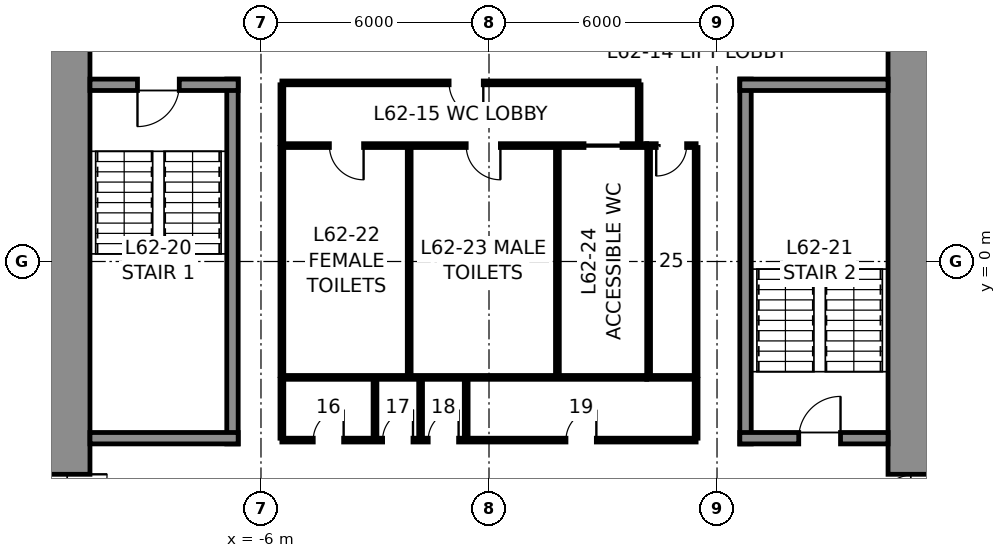
"""IFC4 building model, lengths in metres.
Left out: names, types, materials, properties, quantities, classifications, styles, units other than length and angle.
Written with IfcOpenShell. Run it as: python <this file> out.ifc"""

import sys

from ifc_helpers import new_model, si_unit, direction, frame, frame_2d, origin, place, context, subcontext, project, spatial, rectangle, extrude, element, fill, save


model = new_model("IFC4")
c1 = context("Model", 3, precision=1e-05, world=origin(), true_north=direction((0.0, 1.0)))
c2 = subcontext(c1, "Body", "Model", "MODEL_VIEW")
j1 = project(units=[si_unit("LENGTHUNIT", "METRE"), si_unit("PLANEANGLEUNIT", "RADIAN")], contexts=[c1])
p1 = place(None, origin())
s1 = spatial("IfcSite", under=j1, at=p1, CompositionType="ELEMENT")
p2 = place(p1, origin())
s2 = spatial("IfcBuilding", under=s1, at=p2, CompositionType="ELEMENT")
p3 = place(p2, frame((0.0, 0.0, 277.8)))
s3 = spatial("IfcBuildingStorey", under=s2, at=p3, CompositionType="ELEMENT", Elevation=277.8)
p4 = place(p3, frame((11.25, 10.5, 0.0), z_axis=(0.0, 0.0, 1.0), x_axis=(0.0, -1.0, 0.0)))
e1 = element("IfcWall", 1, at=p4, inside=s3, PredefinedType="SHEAR", context=c2, shape_type="SweptSolid", body=[
    extrude(rectangle(XDim=21.0, YDim=1.5, at=frame_2d((10.5, 0.0))), origin(), (0.0, 0.0, 1.0), 4.0),
])
p5 = place(p4, frame((3.7, 0.0, 0.0)))
e2 = element("IfcOpeningElement", 2, at=p5, cuts=e1, PredefinedType="OPENING", context=c2, shape_type="SweptSolid", body=[
    extrude(rectangle(XDim=1.2, YDim=2.3, at=frame_2d((0.6, 1.15))), frame((0.0, 0.76, 0.0), z_axis=(0.0, -1.0, 0.0), x_axis=(1.0, 0.0, 0.0)), (0.0, 0.0, 1.0), 1.52),
])
p6 = place(p4, frame((16.1, 0.0, 0.0)))
e3 = element("IfcOpeningElement", 3, at=p6, cuts=e1, PredefinedType="OPENING", context=c2, shape_type="SweptSolid", body=[
    extrude(rectangle(XDim=1.2, YDim=2.3, at=frame_2d((0.6, 1.15))), frame((0.0, 0.76, 0.0), z_axis=(0.0, -1.0, 0.0), x_axis=(1.0, 0.0, 0.0)), (0.0, 0.0, 1.0), 1.52),
])
p7 = place(p3, frame((-11.25, -10.5, 0.0), z_axis=(0.0, 0.0, 1.0), x_axis=(0.0, 1.0, 0.0)))
e4 = element("IfcWall", 4, at=p7, inside=s3, PredefinedType="SHEAR", context=c2, shape_type="SweptSolid", body=[
    extrude(rectangle(XDim=21.0, YDim=1.5, at=frame_2d((10.5, 0.0))), origin(), (0.0, 0.0, 1.0), 4.0),
])
p8 = place(p7, frame((16.1, 0.0, 0.0)))
e5 = element("IfcOpeningElement", 5, at=p8, cuts=e4, PredefinedType="OPENING", context=c2, shape_type="SweptSolid", body=[
    extrude(rectangle(XDim=1.2, YDim=2.3, at=frame_2d((0.6, 1.15))), frame((0.0, 0.76, 0.0), z_axis=(0.0, -1.0, 0.0), x_axis=(1.0, 0.0, 0.0)), (0.0, 0.0, 1.0), 1.52),
])
p9 = place(p7, frame((3.7, 0.0, 0.0)))
e6 = element("IfcOpeningElement", 6, at=p9, cuts=e4, PredefinedType="OPENING", context=c2, shape_type="SweptSolid", body=[
    extrude(rectangle(XDim=1.2, YDim=2.3, at=frame_2d((0.6, 1.15))), frame((0.0, 0.76, 0.0), z_axis=(0.0, -1.0, 0.0), x_axis=(1.0, 0.0, 0.0)), (0.0, 0.0, 1.0), 1.52),
])
p10 = place(p3, frame((-6.75, -4.8, 0.0), z_axis=(0.0, 0.0, 1.0), x_axis=(0.0, 1.0, 0.0)))
e7 = element("IfcWall", 7, at=p10, inside=s3, PredefinedType="SOLIDWALL", context=c2, shape_type="SweptSolid", body=[
    extrude(rectangle(XDim=9.6, YDim=0.3, at=frame_2d((4.8, 0.0))), origin(), (0.0, 0.0, 1.0), 3.75),
])
p11 = place(p3, frame((-10.5, 4.65, 0.0), z_axis=(0.0, 0.0, 1.0), x_axis=(1.0, 0.0, 0.0)))
e8 = element("IfcWall", 8, at=p11, inside=s3, PredefinedType="SOLIDWALL", context=c2, shape_type="SweptSolid", body=[
    extrude(rectangle(XDim=3.9, YDim=0.3, at=frame_2d((1.95, 0.0))), origin(), (0.0, 0.0, 1.0), 3.75),
])
p12 = place(p11, frame((1.25, 0.0, 0.0)))
e9 = element("IfcOpeningElement", 9, at=p12, cuts=e8, PredefinedType="OPENING", context=c2, shape_type="SweptSolid", body=[
    extrude(rectangle(XDim=1.1, YDim=2.3, at=frame_2d((0.55, 1.15))), frame((0.0, 0.16, 0.0), z_axis=(0.0, -1.0, 0.0), x_axis=(1.0, 0.0, 0.0)), (0.0, 0.0, 1.0), 0.32),
])
p13 = place(p3, frame((-6.6, -4.65, 0.0), z_axis=(0.0, 0.0, 1.0), x_axis=(-1.0, 0.0, 0.0)))
e10 = element("IfcWall", 10, at=p13, inside=s3, PredefinedType="SOLIDWALL", context=c2, shape_type="SweptSolid", body=[
    extrude(rectangle(XDim=3.9, YDim=0.3, at=frame_2d((1.95, 0.0))), origin(), (0.0, 0.0, 1.0), 3.75),
])
p14 = place(p3, frame((6.75, -4.8, 0.0), z_axis=(0.0, 0.0, 1.0), x_axis=(0.0, 1.0, 0.0)))
e11 = element("IfcWall", 11, at=p14, inside=s3, PredefinedType="SOLIDWALL", context=c2, shape_type="SweptSolid", body=[
    extrude(rectangle(XDim=9.6, YDim=0.3, at=frame_2d((4.8, 0.0))), origin(), (0.0, 0.0, 1.0), 3.75),
])
p15 = place(p3, frame((6.6, 4.65, 0.0), z_axis=(0.0, 0.0, 1.0), x_axis=(1.0, 0.0, 0.0)))
e12 = element("IfcWall", 12, at=p15, inside=s3, PredefinedType="SOLIDWALL", context=c2, shape_type="SweptSolid", body=[
    extrude(rectangle(XDim=3.9, YDim=0.3, at=frame_2d((1.95, 0.0))), origin(), (0.0, 0.0, 1.0), 3.75),
])
p16 = place(p3, frame((10.5, -4.65, 0.0), z_axis=(0.0, 0.0, 1.0), x_axis=(-1.0, 0.0, 0.0)))
e13 = element("IfcWall", 13, at=p16, inside=s3, PredefinedType="SOLIDWALL", context=c2, shape_type="SweptSolid", body=[
    extrude(rectangle(XDim=3.9, YDim=0.3, at=frame_2d((1.95, 0.0))), origin(), (0.0, 0.0, 1.0), 3.75),
])
p17 = place(p16, frame((1.25, 0.0, 0.0)))
e14 = element("IfcOpeningElement", 14, at=p17, cuts=e13, PredefinedType="OPENING", context=c2, shape_type="SweptSolid", body=[
    extrude(rectangle(XDim=1.1, YDim=2.3, at=frame_2d((0.55, 1.15))), frame((0.0, 0.16, 0.0), z_axis=(0.0, -1.0, 0.0), x_axis=(1.0, 0.0, 0.0)), (0.0, 0.0, 1.0), 0.32),
])
p18 = place(p3, frame((-5.45, 3.05, 0.0), z_axis=(0.0, 0.0, 1.0), x_axis=(1.0, 0.0, 0.0)))
e15 = element("IfcWall", 15, at=p18, inside=s3, PredefinedType="PARTITIONING", context=c2, shape_type="SweptSolid", body=[
    extrude(rectangle(XDim=9.6, YDim=0.1, at=frame_2d((4.8, 0.0))), origin(), (0.0, 0.0, 1.0), 3.75),
])
p19 = place(p18, frame((1.25, 0.0, 0.0)))
e16 = element("IfcOpeningElement", 16, at=p19, cuts=e15, PredefinedType="OPENING", context=c2, shape_type="SweptSolid", body=[
    extrude(rectangle(XDim=0.9, YDim=2.3, at=frame_2d((0.45, 1.15))), frame((0.0, 0.06, 0.0), z_axis=(0.0, -1.0, 0.0), x_axis=(1.0, 0.0, 0.0)), (0.0, 0.0, 1.0), 0.12),
])
p20 = place(p18, frame((4.85, 0.0, 0.0)))
e17 = element("IfcOpeningElement", 17, at=p20, cuts=e15, PredefinedType="OPENING", context=c2, shape_type="SweptSolid", body=[
    extrude(rectangle(XDim=0.9, YDim=2.3, at=frame_2d((0.45, 1.15))), frame((0.0, 0.06, 0.0), z_axis=(0.0, -1.0, 0.0), x_axis=(1.0, 0.0, 0.0)), (0.0, 0.0, 1.0), 0.12),
])
p21 = place(p18, frame((7.95, 0.0, 0.0)))
e18 = element("IfcOpeningElement", 18, at=p21, cuts=e15, PredefinedType="OPENING", context=c2, shape_type="SweptSolid", body=[
    extrude(rectangle(XDim=1.0, YDim=2.3, at=frame_2d((0.5, 1.15))), frame((0.0, 0.06, 0.0), z_axis=(0.0, -1.0, 0.0), x_axis=(1.0, 0.0, 0.0)), (0.0, 0.0, 1.0), 0.12),
])
p22 = place(p3, frame((4.15, 3.05, 0.0), z_axis=(0.0, 0.0, 1.0), x_axis=(1.0, 0.0, 0.0)))
e19 = element("IfcWall", 19, at=p22, inside=s3, PredefinedType="PARTITIONING", context=c2, shape_type="SweptSolid", body=[
    extrude(rectangle(XDim=1.3, YDim=0.1, at=frame_2d((0.65, 0.0))), origin(), (0.0, 0.0, 1.0), 3.75),
])
p23 = place(p22, frame((0.25, 0.0, 0.0)))
e20 = element("IfcOpeningElement", 20, at=p23, cuts=e19, PredefinedType="OPENING", context=c2, shape_type="SweptSolid", body=[
    extrude(rectangle(XDim=0.8, YDim=2.3, at=frame_2d((0.4, 1.15))), frame((0.0, 0.06, 0.0), z_axis=(0.0, -1.0, 0.0), x_axis=(1.0, 0.0, 0.0)), (0.0, 0.0, 1.0), 0.12),
])
p24 = place(p3, frame((4.15, -3.05, 0.0), z_axis=(0.0, 0.0, 1.0), x_axis=(-1.0, 0.0, 0.0)))
e21 = element("IfcWall", 21, at=p24, inside=s3, PredefinedType="PARTITIONING", context=c2, shape_type="SweptSolid", body=[
    extrude(rectangle(XDim=9.6, YDim=0.1, at=frame_2d((4.8, 0.0))), origin(), (0.0, 0.0, 1.0), 3.75),
])
p25 = place(p3, frame((5.45, -3.05, 0.0), z_axis=(0.0, 0.0, 1.0), x_axis=(-1.0, 0.0, 0.0)))
e22 = element("IfcWall", 22, at=p25, inside=s3, PredefinedType="PARTITIONING", context=c2, shape_type="SweptSolid", body=[
    extrude(rectangle(XDim=1.3, YDim=0.1, at=frame_2d((0.65, 0.0))), origin(), (0.0, 0.0, 1.0), 3.75),
])
for number, where, z_axis, x_axis in (
    (23, (5.45, 3.0, 0.0), (0.0, 0.0, 1.0), (0.0, -1.0, 0.0)),
    (24, (-5.45, -3.0, 0.0), (0.0, 0.0, 1.0), (0.0, 1.0, 0.0)),
    (25, (-2.1, -3.0, 0.0), (0.0, 0.0, 1.0), (0.0, 1.0, 0.0)),
    (26, (1.8, -3.0, 0.0), (0.0, 0.0, 1.0), (0.0, 1.0, 0.0)),
    (27, (4.2, -3.0, 0.0), (0.0, 0.0, 1.0), (0.0, 1.0, 0.0)),
):
    element("IfcWall", number, at=place(p3, frame(where, z_axis=z_axis, x_axis=x_axis)), inside=s3, PredefinedType="PARTITIONING", context=c2, shape_type="SweptSolid", body=[
        extrude(rectangle(XDim=6.0, YDim=0.1, at=frame_2d((3.0, 0.0))), origin(), (0.0, 0.0, 1.0), 3.75),
    ])
p26 = place(p3, frame((-5.45, 4.7, 0.0), z_axis=(0.0, 0.0, 1.0), x_axis=(1.0, 0.0, 0.0)))
e28 = element("IfcWall", 28, at=p26, inside=s3, PredefinedType="PARTITIONING", context=c2, shape_type="SweptSolid", body=[
    extrude(rectangle(XDim=9.4, YDim=0.1, at=frame_2d((4.7, 0.0))), origin(), (0.0, 0.0, 1.0), 3.75),
])
p27 = place(p26, frame((4.4, 0.0, 0.0)))
e29 = element("IfcOpeningElement", 29, at=p27, cuts=e28, PredefinedType="OPENING", context=c2, shape_type="SweptSolid", body=[
    extrude(rectangle(XDim=0.9, YDim=2.3, at=frame_2d((0.45, 1.15))), frame((0.0, 0.06, 0.0), z_axis=(0.0, -1.0, 0.0), x_axis=(1.0, 0.0, 0.0)), (0.0, 0.0, 1.0), 0.12),
])
for number, where, z_axis, x_axis in (
    (30, (-5.45, 3.1, 0.0), (0.0, 0.0, 1.0), (0.0, 1.0, 0.0)),
    (31, (3.95, 3.1, 0.0), (0.0, 0.0, 1.0), (0.0, 1.0, 0.0)),
):
    element("IfcWall", number, at=place(p3, frame(where, z_axis=z_axis, x_axis=x_axis)), inside=s3, PredefinedType="PARTITIONING", context=c2, shape_type="SweptSolid", body=[
        extrude(rectangle(XDim=1.55, YDim=0.1, at=frame_2d((0.775, 0.0))), origin(), (0.0, 0.0, 1.0), 3.75),
    ])
p28 = place(p3, frame((5.45, -4.7, 0.0), z_axis=(0.0, 0.0, 1.0), x_axis=(-1.0, 0.0, 0.0)))
e32 = element("IfcWall", 32, at=p28, inside=s3, PredefinedType="PARTITIONING", context=c2, shape_type="SweptSolid", body=[
    extrude(rectangle(XDim=10.9, YDim=0.1, at=frame_2d((5.45, 0.0))), origin(), (0.0, 0.0, 1.0), 3.75),
])
p29 = place(p28, frame((9.275, 0.0, 0.0)))
e33 = element("IfcOpeningElement", 33, at=p29, cuts=e32, PredefinedType="OPENING", context=c2, shape_type="SweptSolid", body=[
    extrude(rectangle(XDim=0.8, YDim=2.3, at=frame_2d((0.4, 1.15))), frame((0.0, 0.06, 0.0), z_axis=(0.0, -1.0, 0.0), x_axis=(1.0, 0.0, 0.0)), (0.0, 0.0, 1.0), 0.12),
])
p30 = place(p28, frame((7.45, 0.0, 0.0)))
e34 = element("IfcOpeningElement", 34, at=p30, cuts=e32, PredefinedType="OPENING", context=c2, shape_type="SweptSolid", body=[
    extrude(rectangle(XDim=0.8, YDim=2.3, at=frame_2d((0.4, 1.15))), frame((0.0, 0.06, 0.0), z_axis=(0.0, -1.0, 0.0), x_axis=(1.0, 0.0, 0.0)), (0.0, 0.0, 1.0), 0.12),
])
p31 = place(p28, frame((6.25, 0.0, 0.0)))
e35 = element("IfcOpeningElement", 35, at=p31, cuts=e32, PredefinedType="OPENING", context=c2, shape_type="SweptSolid", body=[
    extrude(rectangle(XDim=0.8, YDim=2.3, at=frame_2d((0.4, 1.15))), frame((0.0, 0.06, 0.0), z_axis=(0.0, -1.0, 0.0), x_axis=(1.0, 0.0, 0.0)), (0.0, 0.0, 1.0), 0.12),
])
p32 = place(p28, frame((2.625, 0.0, 0.0)))
e36 = element("IfcOpeningElement", 36, at=p32, cuts=e32, PredefinedType="OPENING", context=c2, shape_type="SweptSolid", body=[
    extrude(rectangle(XDim=0.8, YDim=2.3, at=frame_2d((0.4, 1.15))), frame((0.0, 0.06, 0.0), z_axis=(0.0, -1.0, 0.0), x_axis=(1.0, 0.0, 0.0)), (0.0, 0.0, 1.0), 0.12),
])
for number, where, z_axis, x_axis in (
    (37, (-5.45, -3.1, 0.0), (0.0, 0.0, 1.0), (0.0, -1.0, 0.0)),
    (38, (5.45, -3.1, 0.0), (0.0, 0.0, 1.0), (0.0, -1.0, 0.0)),
    (39, (-3.0, -3.1, 0.0), (0.0, 0.0, 1.0), (0.0, -1.0, 0.0)),
    (40, (-1.8, -3.1, 0.0), (0.0, 0.0, 1.0), (0.0, -1.0, 0.0)),
    (41, (-0.6, -3.1, 0.0), (0.0, 0.0, 1.0), (0.0, -1.0, 0.0)),
):
    element("IfcWall", number, at=place(p3, frame(where, z_axis=z_axis, x_axis=x_axis)), inside=s3, PredefinedType="PARTITIONING", context=c2, shape_type="SweptSolid", body=[
        extrude(rectangle(XDim=1.55, YDim=0.1, at=frame_2d((0.775, 0.0))), origin(), (0.0, 0.0, 1.0), 3.75),
    ])
p33 = place(p12, frame((1.1, 0.0, 0.0), z_axis=(0.0, 0.0, 1.0), x_axis=(-1.0, 0.0, 0.0)))
e42 = element("IfcDoor", 42, at=p33, inside=s3, OperationType="SINGLE_SWING_RIGHT", PredefinedType="DOOR", context=c2, shape_type="SweptSolid", body=[
    extrude(rectangle(XDim=1.1, YDim=2.3, at=frame_2d((0.55, 1.15))), frame((0.0, 0.025, 0.0), z_axis=(0.0, -1.0, 0.0), x_axis=(1.0, 0.0, 0.0)), (0.0, 0.0, 1.0), 0.05),
])
fill(e9, e42)
p34 = place(p17, frame((1.1, 0.0, 0.0), z_axis=(0.0, 0.0, 1.0), x_axis=(-1.0, 0.0, 0.0)))
e43 = element("IfcDoor", 43, at=p34, inside=s3, OperationType="SINGLE_SWING_RIGHT", PredefinedType="DOOR", context=c2, shape_type="SweptSolid", body=[
    extrude(rectangle(XDim=1.1, YDim=2.3, at=frame_2d((0.55, 1.15))), frame((0.0, 0.025, 0.0), z_axis=(0.0, -1.0, 0.0), x_axis=(1.0, 0.0, 0.0)), (0.0, 0.0, 1.0), 0.05),
])
fill(e14, e43)
p35 = place(p19, frame((0.9, 0.0, 0.0), z_axis=(0.0, 0.0, 1.0), x_axis=(-1.0, 0.0, 0.0)))
e44 = element("IfcDoor", 44, at=p35, inside=s3, OperationType="SINGLE_SWING_LEFT", PredefinedType="DOOR", context=c2, shape_type="SweptSolid", body=[
    extrude(rectangle(XDim=0.9, YDim=2.3, at=frame_2d((0.45, 1.15))), frame((0.0, 0.025, 0.0), z_axis=(0.0, -1.0, 0.0), x_axis=(1.0, 0.0, 0.0)), (0.0, 0.0, 1.0), 0.05),
])
fill(e16, e44)
p36 = place(p20, frame((0.9, 0.0, 0.0), z_axis=(0.0, 0.0, 1.0), x_axis=(-1.0, 0.0, 0.0)))
e45 = element("IfcDoor", 45, at=p36, inside=s3, OperationType="SINGLE_SWING_LEFT", PredefinedType="DOOR", context=c2, shape_type="SweptSolid", body=[
    extrude(rectangle(XDim=0.9, YDim=2.3, at=frame_2d((0.45, 1.15))), frame((0.0, 0.025, 0.0), z_axis=(0.0, -1.0, 0.0), x_axis=(1.0, 0.0, 0.0)), (0.0, 0.0, 1.0), 0.05),
])
fill(e17, e45)
p37 = place(p21, frame((1.0, 0.0, 0.0), z_axis=(0.0, 0.0, 1.0), x_axis=(-1.0, 0.0, 0.0)))
e46 = element("IfcDoor", 46, at=p37, inside=s3, OperationType="SLIDING_TO_LEFT", PredefinedType="DOOR", context=c2, shape_type="SweptSolid", body=[
    extrude(rectangle(XDim=1.0, YDim=2.3, at=frame_2d((0.5, 1.15))), frame((0.0, 0.025, 0.0), z_axis=(0.0, -1.0, 0.0), x_axis=(1.0, 0.0, 0.0)), (0.0, 0.0, 1.0), 0.05),
])
fill(e18, e46)
p38 = place(p23, frame((0.8, 0.0, 0.0), z_axis=(0.0, 0.0, 1.0), x_axis=(-1.0, 0.0, 0.0)))
e47 = element("IfcDoor", 47, at=p38, inside=s3, OperationType="SINGLE_SWING_RIGHT", PredefinedType="DOOR", context=c2, shape_type="SweptSolid", body=[
    extrude(rectangle(XDim=0.8, YDim=2.3, at=frame_2d((0.4, 1.15))), frame((0.0, 0.025, 0.0), z_axis=(0.0, -1.0, 0.0), x_axis=(1.0, 0.0, 0.0)), (0.0, 0.0, 1.0), 0.05),
])
fill(e20, e47)
p39 = place(p27, frame((0.9, 0.0, 0.0), z_axis=(0.0, 0.0, 1.0), x_axis=(-1.0, 0.0, 0.0)))
e48 = element("IfcDoor", 48, at=p39, inside=s3, OperationType="SINGLE_SWING_LEFT", PredefinedType="DOOR", context=c2, shape_type="SweptSolid", body=[
    extrude(rectangle(XDim=0.9, YDim=2.3, at=frame_2d((0.45, 1.15))), frame((0.0, 0.025, 0.0), z_axis=(0.0, -1.0, 0.0), x_axis=(1.0, 0.0, 0.0)), (0.0, 0.0, 1.0), 0.05),
])
fill(e29, e48)
p40 = place(p29, frame((0.8, 0.0, 0.0), z_axis=(0.0, 0.0, 1.0), x_axis=(-1.0, 0.0, 0.0)))
e49 = element("IfcDoor", 49, at=p40, inside=s3, OperationType="SINGLE_SWING_RIGHT", PredefinedType="DOOR", context=c2, shape_type="SweptSolid", body=[
    extrude(rectangle(XDim=0.8, YDim=2.3, at=frame_2d((0.4, 1.15))), frame((0.0, 0.025, 0.0), z_axis=(0.0, -1.0, 0.0), x_axis=(1.0, 0.0, 0.0)), (0.0, 0.0, 1.0), 0.05),
])
fill(e33, e49)
p41 = place(p30, frame((0.8, 0.0, 0.0), z_axis=(0.0, 0.0, 1.0), x_axis=(-1.0, 0.0, 0.0)))
e50 = element("IfcDoor", 50, at=p41, inside=s3, OperationType="SINGLE_SWING_RIGHT", PredefinedType="DOOR", context=c2, shape_type="SweptSolid", body=[
    extrude(rectangle(XDim=0.8, YDim=2.3, at=frame_2d((0.4, 1.15))), frame((0.0, 0.025, 0.0), z_axis=(0.0, -1.0, 0.0), x_axis=(1.0, 0.0, 0.0)), (0.0, 0.0, 1.0), 0.05),
])
fill(e34, e50)
p42 = place(p31, frame((0.8, 0.0, 0.0), z_axis=(0.0, 0.0, 1.0), x_axis=(-1.0, 0.0, 0.0)))
e51 = element("IfcDoor", 51, at=p42, inside=s3, OperationType="SINGLE_SWING_RIGHT", PredefinedType="DOOR", context=c2, shape_type="SweptSolid", body=[
    extrude(rectangle(XDim=0.8, YDim=2.3, at=frame_2d((0.4, 1.15))), frame((0.0, 0.025, 0.0), z_axis=(0.0, -1.0, 0.0), x_axis=(1.0, 0.0, 0.0)), (0.0, 0.0, 1.0), 0.05),
])
fill(e35, e51)
p43 = place(p32, frame((0.8, 0.0, 0.0), z_axis=(0.0, 0.0, 1.0), x_axis=(-1.0, 0.0, 0.0)))
e52 = element("IfcDoor", 52, at=p43, inside=s3, OperationType="SINGLE_SWING_RIGHT", PredefinedType="DOOR", context=c2, shape_type="SweptSolid", body=[
    extrude(rectangle(XDim=0.8, YDim=2.3, at=frame_2d((0.4, 1.15))), frame((0.0, 0.025, 0.0), z_axis=(0.0, -1.0, 0.0), x_axis=(1.0, 0.0, 0.0)), (0.0, 0.0, 1.0), 0.05),
])
fill(e36, e52)
p44 = place(p9, frame((1.2, 0.0, 0.0), z_axis=(0.0, 0.0, 1.0), x_axis=(-1.0, 0.0, 0.0)))
e53 = element("IfcDoor", 53, at=p44, inside=s3, OperationType="SINGLE_SWING_LEFT", PredefinedType="DOOR", context=c2, shape_type="SweptSolid", body=[
    extrude(rectangle(XDim=1.2, YDim=2.3, at=frame_2d((0.6, 1.15))), frame((0.0, 0.025, 0.0), z_axis=(0.0, -1.0, 0.0), x_axis=(1.0, 0.0, 0.0)), (0.0, 0.0, 1.0), 0.05),
])
fill(e6, e53)
p45 = place(p6, frame((1.2, 0.0, 0.0), z_axis=(0.0, 0.0, 1.0), x_axis=(-1.0, 0.0, 0.0)))
e54 = element("IfcDoor", 54, at=p45, inside=s3, OperationType="SINGLE_SWING_LEFT", PredefinedType="DOOR", context=c2, shape_type="SweptSolid", body=[
    extrude(rectangle(XDim=1.2, YDim=2.3, at=frame_2d((0.6, 1.15))), frame((0.0, 0.025, 0.0), z_axis=(0.0, -1.0, 0.0), x_axis=(1.0, 0.0, 0.0)), (0.0, 0.0, 1.0), 0.05),
])
fill(e3, e54)
save(model, sys.argv[1])
